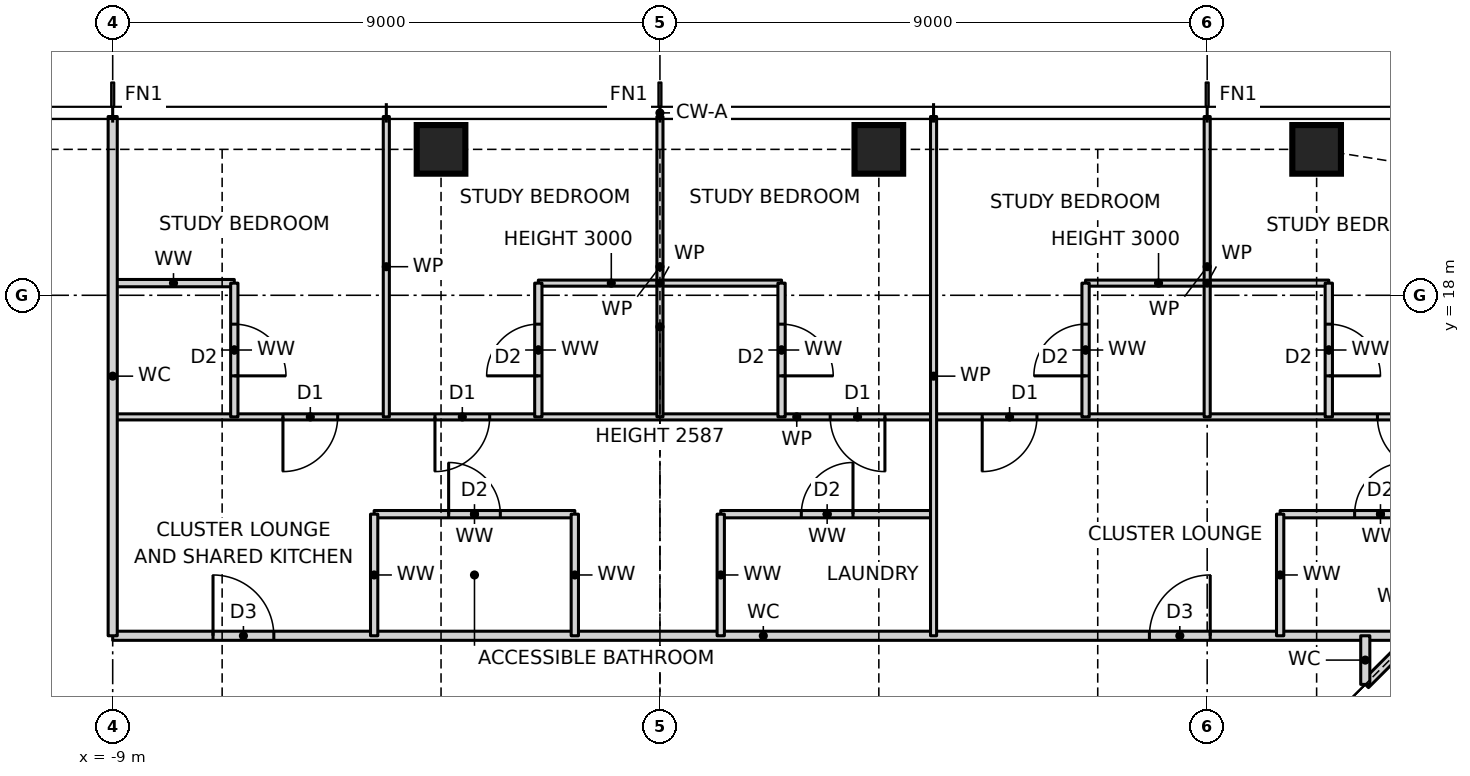
"""IFC4 building model, lengths in metres.
Left out: names, types, materials, properties, quantities, classifications, styles, units other than length and angle.
Written with IfcOpenShell. Run it as: python <this file> out.ifc"""

import sys

from ifc_helpers import new_model, si_unit, direction, frame, frame_2d, origin, origin_2d, place, context, subcontext, project, spatial, rectangle, hollow_rectangle, extrude, element, fill, save


model = new_model("IFC4")
c1 = context("Model", 3, precision=1e-05, world=origin(), true_north=direction((0.0, 1.0)))
c2 = subcontext(c1, "Body", "Model", "MODEL_VIEW")
j1 = project(units=[si_unit("LENGTHUNIT", "METRE"), si_unit("PLANEANGLEUNIT", "RADIAN")], contexts=[c1])
p1 = place(None, origin())
s1 = spatial("IfcSite", under=j1, at=p1, CompositionType="ELEMENT")
p2 = place(p1, origin())
s2 = spatial("IfcBuilding", under=s1, at=p2, CompositionType="ELEMENT")
p3 = place(p2, frame((0.0, 0.0, 119.0)))
s3 = spatial("IfcBuildingStorey", under=s2, at=p3, CompositionType="ELEMENT", Elevation=119.0)
for number, where, z_axis, x_axis in (
    (1, (10.8, 20.4, 0.0), (0.0, 0.0, 1.0), (1.0, 0.0, 0.0)),
    (2, (3.6, 20.4, 0.0), (0.0, 0.0, 1.0), (1.0, 0.0, 0.0)),
    (3, (-3.6, 20.4, 0.0), (0.0, 0.0, 1.0), (1.0, 0.0, 0.0)),
):
    element("IfcColumn", number, at=place(p3, frame(where, z_axis=z_axis, x_axis=x_axis)), inside=s3, PredefinedType="COLUMN", context=c2, shape_type="SweptSolid", body=[
        extrude(hollow_rectangle(XDim=0.8, YDim=0.8, WallThickness=0.07, at=origin_2d()), origin(), (0.0, 0.0, 1.0), 3.5),
    ])
p4 = place(p3, frame((-9.0, 12.4, 0.0), z_axis=(0.0, 0.0, 1.0), x_axis=(1.0, 0.0, 0.0)))
e4 = element("IfcWall", 4, at=p4, inside=s3, PredefinedType="PARTITIONING", context=c2, shape_type="SweptSolid", body=[
    extrude(rectangle(XDim=21.4, YDim=0.15, at=frame_2d((10.7, 0.0))), origin(), (0.0, 0.0, 1.0), 3.27),
])
p5 = place(p4, frame((17.05, 0.0, 0.0)))
e5 = element("IfcOpeningElement", 5, at=p5, cuts=e4, PredefinedType="OPENING", context=c2, shape_type="SweptSolid", body=[
    extrude(rectangle(XDim=1.0, YDim=2.1, at=frame_2d((0.5, 1.05))), frame((0.0, 0.085, 0.0), z_axis=(0.0, -1.0, 0.0), x_axis=(1.0, 0.0, 0.0)), (0.0, 0.0, 1.0), 0.17),
])
p6 = place(p4, frame((1.65, 0.0, 0.0)))
e6 = element("IfcOpeningElement", 6, at=p6, cuts=e4, PredefinedType="OPENING", context=c2, shape_type="SweptSolid", body=[
    extrude(rectangle(XDim=1.0, YDim=2.1, at=frame_2d((0.5, 1.05))), frame((0.0, 0.085, 0.0), z_axis=(0.0, -1.0, 0.0), x_axis=(1.0, 0.0, 0.0)), (0.0, 0.0, 1.0), 0.17),
])
p7 = place(p3, frame((-4.7, 14.4, 0.0), z_axis=(0.0, 0.0, 1.0), x_axis=(1.0, 0.0, 0.0)))
e7 = element("IfcWall", 7, at=p7, inside=s3, PredefinedType="PARTITIONING", context=c2, shape_type="SweptSolid", body=[
    extrude(rectangle(XDim=3.3, YDim=0.12, at=frame_2d((1.65, 0.0))), origin(), (0.0, 0.0, 1.0), 3.27),
])
p8 = place(p7, frame((1.225, 0.0, 0.0)))
e8 = element("IfcOpeningElement", 8, at=p8, cuts=e7, PredefinedType="OPENING", context=c2, shape_type="SweptSolid", body=[
    extrude(rectangle(XDim=0.85, YDim=2.1, at=frame_2d((0.425, 1.05))), frame((0.0, 0.07, 0.0), z_axis=(0.0, -1.0, 0.0), x_axis=(1.0, 0.0, 0.0)), (0.0, 0.0, 1.0), 0.14),
])
p9 = place(p3, frame((1.0, 14.4, 0.0), z_axis=(0.0, 0.0, 1.0), x_axis=(1.0, 0.0, 0.0)))
e9 = element("IfcWall", 9, at=p9, inside=s3, PredefinedType="PARTITIONING", context=c2, shape_type="SweptSolid", body=[
    extrude(rectangle(XDim=3.5, YDim=0.12, at=frame_2d((1.75, 0.0))), origin(), (0.0, 0.0, 1.0), 3.27),
])
p10 = place(p9, frame((1.325, 0.0, 0.0)))
e10 = element("IfcOpeningElement", 10, at=p10, cuts=e9, PredefinedType="OPENING", context=c2, shape_type="SweptSolid", body=[
    extrude(rectangle(XDim=0.85, YDim=2.1, at=frame_2d((0.425, 1.05))), frame((0.0, 0.07, 0.0), z_axis=(0.0, -1.0, 0.0), x_axis=(1.0, 0.0, 0.0)), (0.0, 0.0, 1.0), 0.14),
])
p11 = place(p3, frame((10.2, 14.4, 0.0), z_axis=(0.0, 0.0, 1.0), x_axis=(1.0, 0.0, 0.0)))
e11 = element("IfcWall", 11, at=p11, inside=s3, PredefinedType="PARTITIONING", context=c2, shape_type="SweptSolid", body=[
    extrude(rectangle(XDim=3.3, YDim=0.12, at=frame_2d((1.65, 0.0))), origin(), (0.0, 0.0, 1.0), 3.27),
])
p12 = place(p11, frame((1.225, 0.0, 0.0)))
e12 = element("IfcOpeningElement", 12, at=p12, cuts=e11, PredefinedType="OPENING", context=c2, shape_type="SweptSolid", body=[
    extrude(rectangle(XDim=0.85, YDim=2.1, at=frame_2d((0.425, 1.05))), frame((0.0, 0.07, 0.0), z_axis=(0.0, -1.0, 0.0), x_axis=(1.0, 0.0, 0.0)), (0.0, 0.0, 1.0), 0.14),
])
p13 = place(p3, frame((-9.0, 16.0, 0.0), z_axis=(0.0, 0.0, 1.0), x_axis=(1.0, 0.0, 0.0)))
e13 = element("IfcWall", 13, at=p13, inside=s3, PredefinedType="PARTITIONING", context=c2, shape_type="SweptSolid", body=[
    extrude(rectangle(XDim=22.5, YDim=0.1, at=frame_2d((11.25, 0.0))), origin(), (0.0, 0.0, 1.0), 3.27),
])
p14 = place(p13, frame((20.8, 0.0, 0.0)))
e14 = element("IfcOpeningElement", 14, at=p14, cuts=e13, PredefinedType="OPENING", context=c2, shape_type="SweptSolid", body=[
    extrude(rectangle(XDim=0.9, YDim=2.1, at=frame_2d((0.45, 1.05))), frame((0.0, 0.06, 0.0), z_axis=(0.0, -1.0, 0.0), x_axis=(1.0, 0.0, 0.0)), (0.0, 0.0, 1.0), 0.12),
])
p15 = place(p13, frame((14.3, 0.0, 0.0)))
e15 = element("IfcOpeningElement", 15, at=p15, cuts=e13, PredefinedType="OPENING", context=c2, shape_type="SweptSolid", body=[
    extrude(rectangle(XDim=0.9, YDim=2.1, at=frame_2d((0.45, 1.05))), frame((0.0, 0.06, 0.0), z_axis=(0.0, -1.0, 0.0), x_axis=(1.0, 0.0, 0.0)), (0.0, 0.0, 1.0), 0.12),
])
p16 = place(p13, frame((11.8, 0.0, 0.0)))
e16 = element("IfcOpeningElement", 16, at=p16, cuts=e13, PredefinedType="OPENING", context=c2, shape_type="SweptSolid", body=[
    extrude(rectangle(XDim=0.9, YDim=2.1, at=frame_2d((0.45, 1.05))), frame((0.0, 0.06, 0.0), z_axis=(0.0, -1.0, 0.0), x_axis=(1.0, 0.0, 0.0)), (0.0, 0.0, 1.0), 0.12),
])
p17 = place(p13, frame((5.3, 0.0, 0.0)))
e17 = element("IfcOpeningElement", 17, at=p17, cuts=e13, PredefinedType="OPENING", context=c2, shape_type="SweptSolid", body=[
    extrude(rectangle(XDim=0.9, YDim=2.1, at=frame_2d((0.45, 1.05))), frame((0.0, 0.06, 0.0), z_axis=(0.0, -1.0, 0.0), x_axis=(1.0, 0.0, 0.0)), (0.0, 0.0, 1.0), 0.12),
])
p18 = place(p13, frame((2.8, 0.0, 0.0)))
e18 = element("IfcOpeningElement", 18, at=p18, cuts=e13, PredefinedType="OPENING", context=c2, shape_type="SweptSolid", body=[
    extrude(rectangle(XDim=0.9, YDim=2.1, at=frame_2d((0.45, 1.05))), frame((0.0, 0.06, 0.0), z_axis=(0.0, -1.0, 0.0), x_axis=(1.0, 0.0, 0.0)), (0.0, 0.0, 1.0), 0.12),
])
p19 = place(p3, frame((-9.0, 18.2, 0.0), z_axis=(0.0, 0.0, 1.0), x_axis=(1.0, 0.0, 0.0)))
e19 = element("IfcWall", 19, at=p19, inside=s3, PredefinedType="PARTITIONING", context=c2, shape_type="SweptSolid", body=[
    extrude(rectangle(XDim=2.0, YDim=0.12, at=frame_2d((1.0, 0.0))), origin(), (0.0, 0.0, 1.0), 3.27),
])
for number, where, z_axis, x_axis in (
    (20, (-2.0, 18.2, 0.0), (0.0, 0.0, 1.0), (1.0, 0.0, 0.0)),
    (21, (7.0, 18.2, 0.0), (0.0, 0.0, 1.0), (1.0, 0.0, 0.0)),
):
    element("IfcWall", number, at=place(p3, frame(where, z_axis=z_axis, x_axis=x_axis)), inside=s3, PredefinedType="PARTITIONING", context=c2, shape_type="SweptSolid", body=[
        extrude(rectangle(XDim=4.0, YDim=0.1, at=frame_2d((2.0, 0.0))), origin(), (0.0, 0.0, 1.0), 3.0),
    ])
p20 = place(p3, frame((11.6, 11.6, 0.0), z_axis=(0.0, 0.0, 1.0), x_axis=(0.707106781187, 0.707106781187, 0.0)))
e22 = element("IfcWall", 22, at=p20, inside=s3, PredefinedType="PARTITIONING", context=c2, shape_type="SweptSolid", body=[
    extrude(rectangle(XDim=2.687, YDim=0.15, at=frame_2d((1.343, 0.0))), origin(), (0.0, 0.0, 1.0), 2.343),
])
p21 = place(p3, frame((11.6, 11.6, 0.0), z_axis=(0.0, 0.0, 1.0), x_axis=(0.0, 1.0, 0.0)))
e23 = element("IfcWall", 23, at=p21, inside=s3, PredefinedType="PARTITIONING", context=c2, shape_type="SweptSolid", body=[
    extrude(rectangle(XDim=0.8, YDim=0.15, at=frame_2d((0.4, 0.0))), origin(), (0.0, 0.0, 1.0), 3.27),
])
p22 = place(p3, frame((11.0, 16.0, 0.0), z_axis=(0.0, 0.0, 1.0), x_axis=(0.0, 1.0, 0.0)))
e24 = element("IfcWall", 24, at=p22, inside=s3, PredefinedType="PARTITIONING", context=c2, shape_type="SweptSolid", body=[
    extrude(rectangle(XDim=2.2, YDim=0.12, at=frame_2d((1.1, 0.0))), origin(), (0.0, 0.0, 1.0), 3.27),
])
p23 = place(p22, frame((0.675, 0.0, 0.0)))
e25 = element("IfcOpeningElement", 25, at=p23, cuts=e24, PredefinedType="OPENING", context=c2, shape_type="SweptSolid", body=[
    extrude(rectangle(XDim=0.85, YDim=2.1, at=frame_2d((0.425, 1.05))), frame((0.0, 0.07, 0.0), z_axis=(0.0, -1.0, 0.0), x_axis=(1.0, 0.0, 0.0)), (0.0, 0.0, 1.0), 0.14),
])
p24 = place(p3, frame((10.2, 12.4, 0.0), z_axis=(0.0, 0.0, 1.0), x_axis=(0.0, 1.0, 0.0)))
e26 = element("IfcWall", 26, at=p24, inside=s3, PredefinedType="PARTITIONING", context=c2, shape_type="SweptSolid", body=[
    extrude(rectangle(XDim=2.0, YDim=0.12, at=frame_2d((1.0, 0.0))), origin(), (0.0, 0.0, 1.0), 3.27),
])
p25 = place(p3, frame((9.0, 16.0, 0.0), z_axis=(0.0, 0.0, 1.0), x_axis=(0.0, 1.0, 0.0)))
e27 = element("IfcWall", 27, at=p25, inside=s3, PredefinedType="PARTITIONING", context=c2, shape_type="SweptSolid", body=[
    extrude(rectangle(XDim=4.94, YDim=0.1, at=frame_2d((2.47, 0.0))), origin(), (0.0, 0.0, 1.0), 3.27),
])
p26 = place(p3, frame((7.0, 16.0, 0.0), z_axis=(0.0, 0.0, 1.0), x_axis=(0.0, 1.0, 0.0)))
e28 = element("IfcWall", 28, at=p26, inside=s3, PredefinedType="PARTITIONING", context=c2, shape_type="SweptSolid", body=[
    extrude(rectangle(XDim=2.2, YDim=0.12, at=frame_2d((1.1, 0.0))), origin(), (0.0, 0.0, 1.0), 3.27),
])
p27 = place(p26, frame((0.675, 0.0, 0.0)))
e29 = element("IfcOpeningElement", 29, at=p27, cuts=e28, PredefinedType="OPENING", context=c2, shape_type="SweptSolid", body=[
    extrude(rectangle(XDim=0.85, YDim=2.1, at=frame_2d((0.425, 1.05))), frame((0.0, 0.07, 0.0), z_axis=(0.0, -1.0, 0.0), x_axis=(1.0, 0.0, 0.0)), (0.0, 0.0, 1.0), 0.14),
])
p28 = place(p3, frame((4.5, 12.4, 0.0), z_axis=(0.0, 0.0, 1.0), x_axis=(0.0, 1.0, 0.0)))
e30 = element("IfcWall", 30, at=p28, inside=s3, PredefinedType="PARTITIONING", context=c2, shape_type="SweptSolid", body=[
    extrude(rectangle(XDim=8.54, YDim=0.1, at=frame_2d((4.27, 0.0))), origin(), (0.0, 0.0, 1.0), 3.27),
])
p29 = place(p3, frame((2.0, 16.0, 0.0), z_axis=(0.0, 0.0, 1.0), x_axis=(0.0, 1.0, 0.0)))
e31 = element("IfcWall", 31, at=p29, inside=s3, PredefinedType="PARTITIONING", context=c2, shape_type="SweptSolid", body=[
    extrude(rectangle(XDim=2.2, YDim=0.12, at=frame_2d((1.1, 0.0))), origin(), (0.0, 0.0, 1.0), 3.27),
])
p30 = place(p29, frame((0.675, 0.0, 0.0)))
e32 = element("IfcOpeningElement", 32, at=p30, cuts=e31, PredefinedType="OPENING", context=c2, shape_type="SweptSolid", body=[
    extrude(rectangle(XDim=0.85, YDim=2.1, at=frame_2d((0.425, 1.05))), frame((0.0, 0.07, 0.0), z_axis=(0.0, -1.0, 0.0), x_axis=(1.0, 0.0, 0.0)), (0.0, 0.0, 1.0), 0.14),
])
p31 = place(p3, frame((1.0, 12.4, 0.0), z_axis=(0.0, 0.0, 1.0), x_axis=(0.0, 1.0, 0.0)))
e33 = element("IfcWall", 33, at=p31, inside=s3, PredefinedType="PARTITIONING", context=c2, shape_type="SweptSolid", body=[
    extrude(rectangle(XDim=2.0, YDim=0.12, at=frame_2d((1.0, 0.0))), origin(), (0.0, 0.0, 1.0), 3.27),
])
p32 = place(p3, frame((0.0, 16.0, 0.0), z_axis=(0.0, 0.0, 1.0), x_axis=(0.0, 1.0, 0.0)))
e34 = element("IfcWall", 34, at=p32, inside=s3, PredefinedType="PARTITIONING", context=c2, shape_type="SweptSolid", body=[
    extrude(rectangle(XDim=4.94, YDim=0.1, at=frame_2d((2.47, 0.0))), origin(), (0.0, 0.0, 1.0), 2.587),
])
p33 = place(p3, frame((-1.4, 12.4, 0.0), z_axis=(0.0, 0.0, 1.0), x_axis=(0.0, 1.0, 0.0)))
e35 = element("IfcWall", 35, at=p33, inside=s3, PredefinedType="PARTITIONING", context=c2, shape_type="SweptSolid", body=[
    extrude(rectangle(XDim=2.0, YDim=0.12, at=frame_2d((1.0, 0.0))), origin(), (0.0, 0.0, 1.0), 3.27),
])
p34 = place(p3, frame((-2.0, 16.0, 0.0), z_axis=(0.0, 0.0, 1.0), x_axis=(0.0, 1.0, 0.0)))
e36 = element("IfcWall", 36, at=p34, inside=s3, PredefinedType="PARTITIONING", context=c2, shape_type="SweptSolid", body=[
    extrude(rectangle(XDim=2.2, YDim=0.12, at=frame_2d((1.1, 0.0))), origin(), (0.0, 0.0, 1.0), 3.27),
])
p35 = place(p34, frame((0.675, 0.0, 0.0)))
e37 = element("IfcOpeningElement", 37, at=p35, cuts=e36, PredefinedType="OPENING", context=c2, shape_type="SweptSolid", body=[
    extrude(rectangle(XDim=0.85, YDim=2.1, at=frame_2d((0.425, 1.05))), frame((0.0, 0.07, 0.0), z_axis=(0.0, -1.0, 0.0), x_axis=(1.0, 0.0, 0.0)), (0.0, 0.0, 1.0), 0.14),
])
p36 = place(p3, frame((-4.5, 16.0, 0.0), z_axis=(0.0, 0.0, 1.0), x_axis=(0.0, 1.0, 0.0)))
e38 = element("IfcWall", 38, at=p36, inside=s3, PredefinedType="PARTITIONING", context=c2, shape_type="SweptSolid", body=[
    extrude(rectangle(XDim=4.94, YDim=0.1, at=frame_2d((2.47, 0.0))), origin(), (0.0, 0.0, 1.0), 3.27),
])
p37 = place(p3, frame((-4.7, 12.4, 0.0), z_axis=(0.0, 0.0, 1.0), x_axis=(0.0, 1.0, 0.0)))
e39 = element("IfcWall", 39, at=p37, inside=s3, PredefinedType="PARTITIONING", context=c2, shape_type="SweptSolid", body=[
    extrude(rectangle(XDim=2.0, YDim=0.12, at=frame_2d((1.0, 0.0))), origin(), (0.0, 0.0, 1.0), 3.27),
])
p38 = place(p3, frame((-7.0, 16.0, 0.0), z_axis=(0.0, 0.0, 1.0), x_axis=(0.0, 1.0, 0.0)))
e40 = element("IfcWall", 40, at=p38, inside=s3, PredefinedType="PARTITIONING", context=c2, shape_type="SweptSolid", body=[
    extrude(rectangle(XDim=2.2, YDim=0.12, at=frame_2d((1.1, 0.0))), origin(), (0.0, 0.0, 1.0), 3.27),
])
p39 = place(p38, frame((0.675, 0.0, 0.0)))
e41 = element("IfcOpeningElement", 41, at=p39, cuts=e40, PredefinedType="OPENING", context=c2, shape_type="SweptSolid", body=[
    extrude(rectangle(XDim=0.85, YDim=2.1, at=frame_2d((0.425, 1.05))), frame((0.0, 0.07, 0.0), z_axis=(0.0, -1.0, 0.0), x_axis=(1.0, 0.0, 0.0)), (0.0, 0.0, 1.0), 0.14),
])
p40 = place(p3, frame((-9.0, 12.4, 0.0), z_axis=(0.0, 0.0, 1.0), x_axis=(0.0, 1.0, 0.0)))
e42 = element("IfcWall", 42, at=p40, inside=s3, PredefinedType="PARTITIONING", context=c2, shape_type="SweptSolid", body=[
    extrude(rectangle(XDim=8.54, YDim=0.15, at=frame_2d((4.27, 0.0))), origin(), (0.0, 0.0, 1.0), 3.27),
])
p41 = place(p23, frame((0.85, 0.0, 0.0), z_axis=(0.0, 0.0, 1.0), x_axis=(-1.0, 0.0, 0.0)))
e43 = element("IfcDoor", 43, at=p41, inside=s3, OperationType="SINGLE_SWING_RIGHT", PredefinedType="DOOR", context=c2, shape_type="SweptSolid", body=[
    extrude(rectangle(XDim=0.85, YDim=2.1, at=frame_2d((0.425, 1.05))), frame((0.0, 0.025, 0.0), z_axis=(0.0, -1.0, 0.0), x_axis=(1.0, 0.0, 0.0)), (0.0, 0.0, 1.0), 0.05),
])
fill(e25, e43)
p42 = place(p14, frame((0.9, 0.0, 0.0), z_axis=(0.0, 0.0, 1.0), x_axis=(-1.0, 0.0, 0.0)))
e44 = element("IfcDoor", 44, at=p42, inside=s3, OperationType="SINGLE_SWING_LEFT", PredefinedType="DOOR", context=c2, shape_type="SweptSolid", body=[
    extrude(rectangle(XDim=0.9, YDim=2.1, at=frame_2d((0.45, 1.05))), frame((0.0, 0.025, 0.0), z_axis=(0.0, -1.0, 0.0), x_axis=(1.0, 0.0, 0.0)), (0.0, 0.0, 1.0), 0.05),
])
fill(e14, e44)
p43 = place(p27, origin())
e45 = element("IfcDoor", 45, at=p43, inside=s3, OperationType="SINGLE_SWING_LEFT", PredefinedType="DOOR", context=c2, shape_type="SweptSolid", body=[
    extrude(rectangle(XDim=0.85, YDim=2.1, at=frame_2d((0.425, 1.05))), frame((0.0, 0.025, 0.0), z_axis=(0.0, -1.0, 0.0), x_axis=(1.0, 0.0, 0.0)), (0.0, 0.0, 1.0), 0.05),
])
fill(e29, e45)
p44 = place(p15, frame((0.9, 0.0, 0.0), z_axis=(0.0, 0.0, 1.0), x_axis=(-1.0, 0.0, 0.0)))
e46 = element("IfcDoor", 46, at=p44, inside=s3, OperationType="SINGLE_SWING_RIGHT", PredefinedType="DOOR", context=c2, shape_type="SweptSolid", body=[
    extrude(rectangle(XDim=0.9, YDim=2.1, at=frame_2d((0.45, 1.05))), frame((0.0, 0.025, 0.0), z_axis=(0.0, -1.0, 0.0), x_axis=(1.0, 0.0, 0.0)), (0.0, 0.0, 1.0), 0.05),
])
fill(e15, e46)
p45 = place(p5, origin())
e47 = element("IfcDoor", 47, at=p45, inside=s3, OperationType="SINGLE_SWING_RIGHT", PredefinedType="DOOR", context=c2, shape_type="SweptSolid", body=[
    extrude(rectangle(XDim=1.0, YDim=2.1, at=frame_2d((0.5, 1.05))), frame((0.0, 0.025, 0.0), z_axis=(0.0, -1.0, 0.0), x_axis=(1.0, 0.0, 0.0)), (0.0, 0.0, 1.0), 0.05),
])
fill(e5, e47)
p46 = place(p12, origin())
e48 = element("IfcDoor", 48, at=p46, inside=s3, OperationType="SINGLE_SWING_RIGHT", PredefinedType="DOOR", context=c2, shape_type="SweptSolid", body=[
    extrude(rectangle(XDim=0.85, YDim=2.1, at=frame_2d((0.425, 1.05))), frame((0.0, 0.025, 0.0), z_axis=(0.0, -1.0, 0.0), x_axis=(1.0, 0.0, 0.0)), (0.0, 0.0, 1.0), 0.05),
])
fill(e12, e48)
p47 = place(p30, frame((0.85, 0.0, 0.0), z_axis=(0.0, 0.0, 1.0), x_axis=(-1.0, 0.0, 0.0)))
e49 = element("IfcDoor", 49, at=p47, inside=s3, OperationType="SINGLE_SWING_RIGHT", PredefinedType="DOOR", context=c2, shape_type="SweptSolid", body=[
    extrude(rectangle(XDim=0.85, YDim=2.1, at=frame_2d((0.425, 1.05))), frame((0.0, 0.025, 0.0), z_axis=(0.0, -1.0, 0.0), x_axis=(1.0, 0.0, 0.0)), (0.0, 0.0, 1.0), 0.05),
])
fill(e32, e49)
p48 = place(p16, frame((0.9, 0.0, 0.0), z_axis=(0.0, 0.0, 1.0), x_axis=(-1.0, 0.0, 0.0)))
e50 = element("IfcDoor", 50, at=p48, inside=s3, OperationType="SINGLE_SWING_LEFT", PredefinedType="DOOR", context=c2, shape_type="SweptSolid", body=[
    extrude(rectangle(XDim=0.9, YDim=2.1, at=frame_2d((0.45, 1.05))), frame((0.0, 0.025, 0.0), z_axis=(0.0, -1.0, 0.0), x_axis=(1.0, 0.0, 0.0)), (0.0, 0.0, 1.0), 0.05),
])
fill(e16, e50)
p49 = place(p35, origin())
e51 = element("IfcDoor", 51, at=p49, inside=s3, OperationType="SINGLE_SWING_LEFT", PredefinedType="DOOR", context=c2, shape_type="SweptSolid", body=[
    extrude(rectangle(XDim=0.85, YDim=2.1, at=frame_2d((0.425, 1.05))), frame((0.0, 0.025, 0.0), z_axis=(0.0, -1.0, 0.0), x_axis=(1.0, 0.0, 0.0)), (0.0, 0.0, 1.0), 0.05),
])
fill(e37, e51)
p50 = place(p17, frame((0.9, 0.0, 0.0), z_axis=(0.0, 0.0, 1.0), x_axis=(-1.0, 0.0, 0.0)))
e52 = element("IfcDoor", 52, at=p50, inside=s3, OperationType="SINGLE_SWING_RIGHT", PredefinedType="DOOR", context=c2, shape_type="SweptSolid", body=[
    extrude(rectangle(XDim=0.9, YDim=2.1, at=frame_2d((0.45, 1.05))), frame((0.0, 0.025, 0.0), z_axis=(0.0, -1.0, 0.0), x_axis=(1.0, 0.0, 0.0)), (0.0, 0.0, 1.0), 0.05),
])
fill(e17, e52)
p51 = place(p39, frame((0.85, 0.0, 0.0), z_axis=(0.0, 0.0, 1.0), x_axis=(-1.0, 0.0, 0.0)))
e53 = element("IfcDoor", 53, at=p51, inside=s3, OperationType="SINGLE_SWING_RIGHT", PredefinedType="DOOR", context=c2, shape_type="SweptSolid", body=[
    extrude(rectangle(XDim=0.85, YDim=2.1, at=frame_2d((0.425, 1.05))), frame((0.0, 0.025, 0.0), z_axis=(0.0, -1.0, 0.0), x_axis=(1.0, 0.0, 0.0)), (0.0, 0.0, 1.0), 0.05),
])
fill(e41, e53)
p52 = place(p18, frame((0.9, 0.0, 0.0), z_axis=(0.0, 0.0, 1.0), x_axis=(-1.0, 0.0, 0.0)))
e54 = element("IfcDoor", 54, at=p52, inside=s3, OperationType="SINGLE_SWING_RIGHT", PredefinedType="DOOR", context=c2, shape_type="SweptSolid", body=[
    extrude(rectangle(XDim=0.9, YDim=2.1, at=frame_2d((0.45, 1.05))), frame((0.0, 0.025, 0.0), z_axis=(0.0, -1.0, 0.0), x_axis=(1.0, 0.0, 0.0)), (0.0, 0.0, 1.0), 0.05),
])
fill(e18, e54)
p53 = place(p6, origin())
e55 = element("IfcDoor", 55, at=p53, inside=s3, OperationType="SINGLE_SWING_LEFT", PredefinedType="DOOR", context=c2, shape_type="SweptSolid", body=[
    extrude(rectangle(XDim=1.0, YDim=2.1, at=frame_2d((0.5, 1.05))), frame((0.0, 0.025, 0.0), z_axis=(0.0, -1.0, 0.0), x_axis=(1.0, 0.0, 0.0)), (0.0, 0.0, 1.0), 0.05),
])
fill(e6, e55)
p54 = place(p10, origin())
e56 = element("IfcDoor", 56, at=p54, inside=s3, OperationType="SINGLE_SWING_RIGHT", PredefinedType="DOOR", context=c2, shape_type="SweptSolid", body=[
    extrude(rectangle(XDim=0.85, YDim=2.1, at=frame_2d((0.425, 1.05))), frame((0.0, 0.025, 0.0), z_axis=(0.0, -1.0, 0.0), x_axis=(1.0, 0.0, 0.0)), (0.0, 0.0, 1.0), 0.05),
])
fill(e10, e56)
p55 = place(p8, origin())
e57 = element("IfcDoor", 57, at=p55, inside=s3, OperationType="SINGLE_SWING_LEFT", PredefinedType="DOOR", context=c2, shape_type="SweptSolid", body=[
    extrude(rectangle(XDim=0.85, YDim=2.1, at=frame_2d((0.425, 1.05))), frame((0.0, 0.025, 0.0), z_axis=(0.0, -1.0, 0.0), x_axis=(1.0, 0.0, 0.0)), (0.0, 0.0, 1.0), 0.05),
])
fill(e8, e57)
save(model, sys.argv[1])
